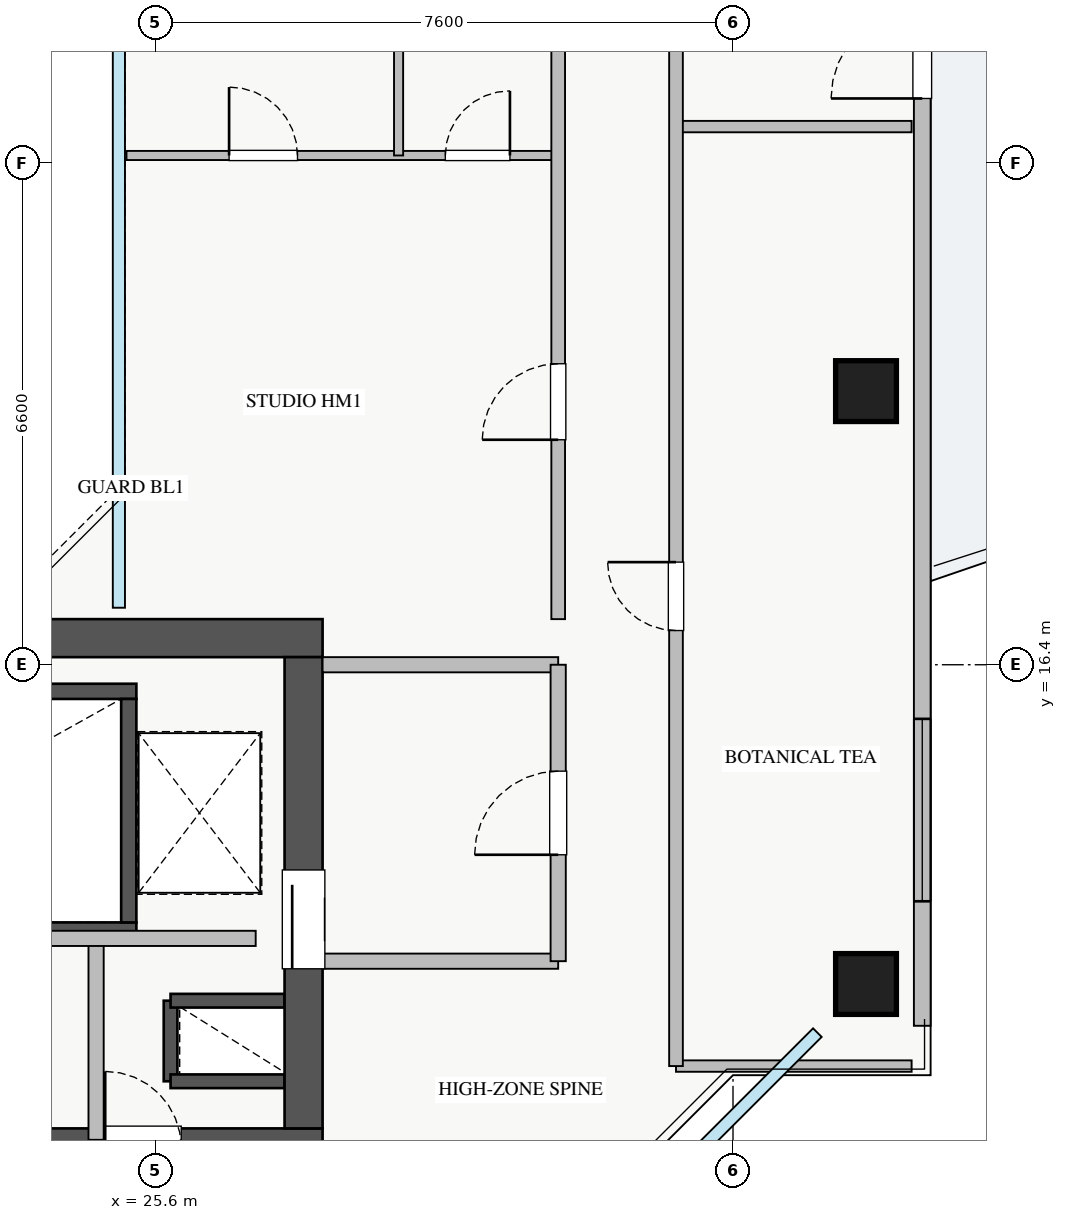
"""IFC4 building model, lengths in metres.
Left out: names, types, materials, properties, quantities, classifications, styles, units other than length and angle.
Written with IfcOpenShell. Run it as: python <this file> out.ifc"""

import sys

from ifc_helpers import new_model, si_unit, direction, frame, frame_2d, origin, origin_2d, place, context, subcontext, project, spatial, rectangle, extrude, source, transform, mapped, element, fill, save


model = new_model("IFC4")
c1 = context("Model", 3, precision=1e-05, world=origin(), true_north=direction((0.0, 1.0)))
c2 = subcontext(c1, "Body", "Model", "MODEL_VIEW")
j1 = project(units=[si_unit("LENGTHUNIT", "METRE"), si_unit("PLANEANGLEUNIT", "RADIAN")], contexts=[c1])
p1 = place(None, origin())
s1 = spatial("IfcSite", under=j1, at=p1, CompositionType="ELEMENT")
p2 = place(p1, origin())
s2 = spatial("IfcBuilding", under=s1, at=p2, CompositionType="ELEMENT")
p3 = place(p2, frame((0.0, 0.0, 197.0)))
s3 = spatial("IfcBuildingStorey", under=s2, at=p3, CompositionType="ELEMENT", Elevation=197.0)
p4 = place(p3, frame((25.8, 10.92, 0.0), z_axis=(0.0, 0.0, 1.0), x_axis=(0.0, 1.0, 0.0)))
e1 = element("IfcWall", 1, at=p4, inside=s3, PredefinedType="SHEAR", context=c2, shape_type="SweptSolid", body=[
    extrude(rectangle(XDim=1.06, YDim=0.18, at=frame_2d((0.53, 0.0))), origin(), (0.0, 0.0, 1.0), 3.07),
])
for number, where, z_axis, x_axis in (
    (2, (25.8, 11.98, 0.0), (0.0, 0.0, 1.0), (1.0, 0.0, 0.0)),
    (3, (25.8, 10.92, 0.0), (0.0, 0.0, 1.0), (1.0, 0.0, 0.0)),
):
    element("IfcWall", number, at=place(p3, frame(where, z_axis=z_axis, x_axis=x_axis)), inside=s3, PredefinedType="SHEAR", context=c2, shape_type="SweptSolid", body=[
        extrude(rectangle(XDim=1.5, YDim=0.18, at=frame_2d((0.75, 0.0))), origin(), (0.0, 0.0, 1.0), 3.07),
    ])
p5 = place(p3, frame((18.2, 12.91, 0.0), z_axis=(0.0, 0.0, 1.0), x_axis=(1.0, 0.0, 0.0)))
e4 = element("IfcWall", 4, at=p5, inside=s3, PredefinedType="SHEAR", context=c2, shape_type="SweptSolid", body=[
    extrude(rectangle(XDim=7.15, YDim=0.2, at=frame_2d((3.575, 0.0))), origin(), (0.0, 0.0, 1.0), 3.25),
])
p6 = place(p5, frame((0.35, 0.0, 0.0)))
e5 = element("IfcOpeningElement", 5, at=p6, cuts=e4, PredefinedType="OPENING", context=c2, shape_type="SweptSolid", body=[
    extrude(rectangle(XDim=1.1, YDim=2.05, at=frame_2d((0.55, 1.025))), frame((0.0, 0.11, 0.0), z_axis=(0.0, -1.0, 0.0), x_axis=(1.0, 0.0, 0.0)), (0.0, 0.0, 1.0), 0.22),
])
p7 = place(p3, frame((18.2, 16.05, 0.0), z_axis=(0.0, 0.0, 1.0), x_axis=(1.0, 0.0, 0.0)))
e6 = element("IfcWall", 6, at=p7, inside=s3, PredefinedType="SHEAR", context=c2, shape_type="SweptSolid", body=[
    extrude(rectangle(XDim=7.15, YDim=0.2, at=frame_2d((3.575, 0.0))), origin(), (0.0, 0.0, 1.0), 3.25),
])
p8 = place(p3, frame((25.25, 13.01, 0.0), z_axis=(0.0, 0.0, 1.0), x_axis=(0.0, 1.0, 0.0)))
e7 = element("IfcWall", 7, at=p8, inside=s3, PredefinedType="SHEAR", context=c2, shape_type="SweptSolid", body=[
    extrude(rectangle(XDim=2.94, YDim=0.2, at=frame_2d((1.47, 0.0))), origin(), (0.0, 0.0, 1.0), 3.25),
])
p9 = place(p3, frame((10.2, 10.05, 0.0), z_axis=(0.0, 0.0, 1.0), x_axis=(1.0, 0.0, 0.0)))
e8 = element("IfcWall", 8, at=p9, inside=s3, PredefinedType="SHEAR", context=c2, shape_type="SweptSolid", body=[
    extrude(rectangle(XDim=17.6, YDim=0.5, at=frame_2d((8.8, 0.0))), origin(), (0.0, 0.0, 1.0), 3.25),
])
p10 = place(p9, frame((1.15, 0.0, 0.0)))
e9 = element("IfcOpeningElement", 9, at=p10, cuts=e8, PredefinedType="OPENING", context=c2, shape_type="SweptSolid", body=[
    extrude(rectangle(XDim=1.1, YDim=2.05, at=frame_2d((0.55, 1.025))), frame((0.0, 0.26, 0.0), z_axis=(0.0, -1.0, 0.0), x_axis=(1.0, 0.0, 0.0)), (0.0, 0.0, 1.0), 0.52),
])
p11 = place(p9, frame((8.3, 0.0, 0.0)))
e10 = element("IfcOpeningElement", 10, at=p11, cuts=e8, PredefinedType="OPENING", context=c2, shape_type="SweptSolid", body=[
    extrude(rectangle(XDim=1.1, YDim=2.05, at=frame_2d((0.55, 1.025))), frame((0.0, 0.26, 0.0), z_axis=(0.0, -1.0, 0.0), x_axis=(1.0, 0.0, 0.0)), (0.0, 0.0, 1.0), 0.52),
])
p12 = place(p9, frame((2.85, 0.0, 0.0)))
e11 = element("IfcOpeningElement", 11, at=p12, cuts=e8, PredefinedType="OPENING", context=c2, shape_type="SweptSolid", body=[
    extrude(rectangle(XDim=1.1, YDim=2.05, at=frame_2d((0.55, 1.025))), frame((0.0, 0.26, 0.0), z_axis=(0.0, -1.0, 0.0), x_axis=(1.0, 0.0, 0.0)), (0.0, 0.0, 1.0), 0.52),
])
p13 = place(p9, frame((5.8, 0.0, 0.0)))
e12 = element("IfcOpeningElement", 12, at=p13, cuts=e8, PredefinedType="OPENING", context=c2, shape_type="SweptSolid", body=[
    extrude(rectangle(XDim=1.0, YDim=2.05, at=frame_2d((0.5, 1.025))), frame((0.0, 0.26, 0.0), z_axis=(0.0, -1.0, 0.0), x_axis=(1.0, 0.0, 0.0)), (0.0, 0.0, 1.0), 0.52),
])
p14 = place(p9, frame((14.74, 0.0, 0.0)))
e13 = element("IfcOpeningElement", 13, at=p14, cuts=e8, PredefinedType="OPENING", context=c2, shape_type="SweptSolid", body=[
    extrude(rectangle(XDim=1.0, YDim=2.05, at=frame_2d((0.5, 1.025))), frame((0.0, 0.26, 0.0), z_axis=(0.0, -1.0, 0.0), x_axis=(1.0, 0.0, 0.0)), (0.0, 0.0, 1.0), 0.52),
])
p15 = place(p9, frame((11.67, 0.0, 0.0)))
e14 = element("IfcOpeningElement", 14, at=p15, cuts=e8, PredefinedType="OPENING", context=c2, shape_type="SweptSolid", body=[
    extrude(rectangle(XDim=1.0, YDim=2.05, at=frame_2d((0.5, 1.025))), frame((0.0, 0.26, 0.0), z_axis=(0.0, -1.0, 0.0), x_axis=(1.0, 0.0, 0.0)), (0.0, 0.0, 1.0), 0.52),
])
p16 = place(p3, frame((10.2, 16.75, 0.0), z_axis=(0.0, 0.0, 1.0), x_axis=(1.0, 0.0, 0.0)))
e15 = element("IfcWall", 15, at=p16, inside=s3, PredefinedType="SHEAR", context=c2, shape_type="SweptSolid", body=[
    extrude(rectangle(XDim=17.6, YDim=0.5, at=frame_2d((8.8, 0.0))), origin(), (0.0, 0.0, 1.0), 3.25),
])
p17 = place(p3, frame((27.55, 10.3, 0.0), z_axis=(0.0, 0.0, 1.0), x_axis=(0.0, 1.0, 0.0)))
e16 = element("IfcWall", 16, at=p17, inside=s3, PredefinedType="SHEAR", context=c2, shape_type="SweptSolid", body=[
    extrude(rectangle(XDim=6.2, YDim=0.5, at=frame_2d((3.1, 0.0))), origin(), (0.0, 0.0, 1.0), 3.25),
])
p18 = place(p17, frame((2.1, 0.0, 0.0)))
e17 = element("IfcOpeningElement", 17, at=p18, cuts=e16, PredefinedType="OPENING", context=c2, shape_type="SweptSolid", body=[
    extrude(rectangle(XDim=1.3, YDim=2.05, at=frame_2d((0.65, 1.025))), frame((0.0, 0.26, 0.0), z_axis=(0.0, -1.0, 0.0), x_axis=(1.0, 0.0, 0.0)), (0.0, 0.0, 1.0), 0.52),
])
m1 = source(origin(), c2, "Body", "SweptSolid", [
    extrude(rectangle(XDim=0.8, YDim=0.8, at=origin_2d()), origin(), (0.0, 0.0, 1.0), 3.25),
])
for number, where, z_axis, x_axis in (
    (18, (34.95, 12.2, 0.0), (0.0, 0.0, 1.0), (1.0, 0.0, 0.0)),
    (19, (34.95, 20.0, 0.0), (0.0, 0.0, 1.0), (1.0, 0.0, 0.0)),
):
    element("IfcColumn", number, at=place(p3, frame(where, z_axis=z_axis, x_axis=x_axis)), inside=s3, PredefinedType="COLUMN", context=c2, shape_type="MappedRepresentation", body=[
        mapped(m1, transform((0.0, 0.0, 0.0), x_axis=(1.0, 0.0, 0.0), y_axis=(0.0, 1.0, 0.0), z_axis=(0.0, 0.0, 1.0), scale=1.0)),
    ])
p19 = place(p3, frame((35.69, 11.65, 0.0), z_axis=(0.0, 0.0, 1.0), x_axis=(0.0, 1.0, 0.0)))
e20 = element("IfcWall", 20, at=p19, inside=s3, PredefinedType="STANDARD", context=c2, shape_type="SweptSolid", body=[
    extrude(rectangle(XDim=22.7, YDim=0.22, at=frame_2d((11.35, 0.0))), origin(), (0.0, 0.0, 1.0), 2.61),
])
p20 = place(p19, frame((12.2, 0.0, 0.0)))
e21 = element("IfcOpeningElement", 21, at=p20, cuts=e20, PredefinedType="OPENING", context=c2, shape_type="SweptSolid", body=[
    extrude(rectangle(XDim=1.2, YDim=2.1, at=frame_2d((0.6, 1.05))), frame((0.0, 0.12, 0.0), z_axis=(0.0, -1.0, 0.0), x_axis=(1.0, 0.0, 0.0)), (0.0, 0.0, 1.0), 0.24),
])
p21 = place(p19, frame((1.638, 0.0, 0.9)))
e22 = element("IfcOpeningElement", 22, at=p21, cuts=e20, PredefinedType="OPENING", context=c2, shape_type="SweptSolid", body=[
    extrude(rectangle(XDim=2.4, YDim=1.48, at=frame_2d((1.2, 0.74))), frame((0.0, 0.12, 0.0), z_axis=(0.0, -1.0, 0.0), x_axis=(1.0, 0.0, 0.0)), (0.0, 0.0, 1.0), 0.24),
])
p22 = place(p19, frame((18.813, 0.0, 0.9)))
e23 = element("IfcOpeningElement", 23, at=p22, cuts=e20, PredefinedType="OPENING", context=c2, shape_type="SweptSolid", body=[
    extrude(rectangle(XDim=2.1, YDim=1.48, at=frame_2d((1.05, 0.74))), frame((0.0, 0.12, 0.0), z_axis=(0.0, -1.0, 0.0), x_axis=(1.0, 0.0, 0.0)), (0.0, 0.0, 1.0), 0.24),
])
p23 = place(p3, frame((27.8, 16.4, 0.0), z_axis=(0.0, 0.0, 1.0), x_axis=(1.0, 0.0, 0.0)))
e24 = element("IfcWall", 24, at=p23, inside=s3, PredefinedType="PARTITIONING", context=c2, shape_type="SweptSolid", body=[
    extrude(rectangle(XDim=3.1, YDim=0.2, at=frame_2d((1.55, 0.0))), origin(), (0.0, 0.0, 1.0), 3.07),
])
p24 = place(p3, frame((27.8, 12.5, 0.0), z_axis=(0.0, 0.0, 1.0), x_axis=(1.0, 0.0, 0.0)))
e25 = element("IfcWall", 25, at=p24, inside=s3, PredefinedType="PARTITIONING", context=c2, shape_type="SweptSolid", body=[
    extrude(rectangle(XDim=3.1, YDim=0.2, at=frame_2d((1.55, 0.0))), origin(), (0.0, 0.0, 1.0), 2.265),
])
p25 = place(p3, frame((30.9, 12.5, 0.0), z_axis=(0.0, 0.0, 1.0), x_axis=(0.0, 1.0, 0.0)))
e26 = element("IfcWall", 26, at=p25, inside=s3, PredefinedType="PARTITIONING", context=c2, shape_type="SweptSolid", body=[
    extrude(rectangle(XDim=3.9, YDim=0.2, at=frame_2d((1.95, 0.0))), origin(), (0.0, 0.0, 1.0), 3.07),
])
p26 = place(p25, frame((1.4, 0.0, 0.0)))
e27 = element("IfcOpeningElement", 27, at=p26, cuts=e26, PredefinedType="OPENING", context=c2, shape_type="SweptSolid", body=[
    extrude(rectangle(XDim=1.1, YDim=2.05, at=frame_2d((0.55, 1.025))), frame((0.0, 0.11, 0.0), z_axis=(0.0, -1.0, 0.0), x_axis=(1.0, 0.0, 0.0)), (0.0, 0.0, 1.0), 0.22),
])
p27 = place(p3, frame((24.82, 10.15, 0.0), z_axis=(0.0, 0.0, 1.0), x_axis=(0.0, 1.0, 0.0)))
e28 = element("IfcWall", 28, at=p27, inside=s3, PredefinedType="PARTITIONING", context=c2, shape_type="SweptSolid", body=[
    extrude(rectangle(XDim=2.65, YDim=0.2, at=frame_2d((1.325, 0.0))), origin(), (0.0, 0.0, 1.0), 3.07),
])
p28 = place(p3, frame((21.75, 12.8, 0.0), z_axis=(0.0, 0.0, 1.0), x_axis=(1.0, 0.0, 0.0)))
e29 = element("IfcWall", 29, at=p28, inside=s3, PredefinedType="PARTITIONING", context=c2, shape_type="SweptSolid", body=[
    extrude(rectangle(XDim=5.17, YDim=0.2, at=frame_2d((2.585, 0.0))), origin(), (0.0, 0.0, 1.0), 3.07),
])
p29 = place(p3, frame((25.22, 23.1, 0.0), z_axis=(0.0, 0.0, 1.0), x_axis=(1.0, 0.0, 0.0)))
e30 = element("IfcWall", 30, at=p29, inside=s3, PredefinedType="PLUMBINGWALL", context=c2, shape_type="SweptSolid", body=[
    extrude(rectangle(XDim=5.68, YDim=0.12, at=frame_2d((2.84, 0.0))), origin(), (0.0, 0.0, 1.0), 3.07),
])
p30 = place(p29, frame((1.35, 0.0, 0.0)))
e31 = element("IfcOpeningElement", 31, at=p30, cuts=e30, PredefinedType="OPENING", context=c2, shape_type="SweptSolid", body=[
    extrude(rectangle(XDim=0.9, YDim=2.05, at=frame_2d((0.45, 1.025))), frame((0.0, 0.07, 0.0), z_axis=(0.0, -1.0, 0.0), x_axis=(1.0, 0.0, 0.0)), (0.0, 0.0, 1.0), 0.14),
])
p31 = place(p29, frame((4.195, 0.0, 0.0)))
e32 = element("IfcOpeningElement", 32, at=p31, cuts=e30, PredefinedType="OPENING", context=c2, shape_type="SweptSolid", body=[
    extrude(rectangle(XDim=0.85, YDim=2.05, at=frame_2d((0.425, 1.025))), frame((0.0, 0.07, 0.0), z_axis=(0.0, -1.0, 0.0), x_axis=(1.0, 0.0, 0.0)), (0.0, 0.0, 1.0), 0.14),
])
p32 = place(p3, frame((28.8, 23.1, 0.0), z_axis=(0.0, 0.0, 1.0), x_axis=(0.0, 1.0, 0.0)))
e33 = element("IfcWall", 33, at=p32, inside=s3, PredefinedType="PLUMBINGWALL", context=c2, shape_type="SweptSolid", body=[
    extrude(rectangle(XDim=5.9, YDim=0.12, at=frame_2d((2.95, 0.0))), origin(), (0.0, 0.0, 1.0), 3.07),
])
p33 = place(p3, frame((30.9, 17.0, 0.0), z_axis=(0.0, 0.0, 1.0), x_axis=(0.0, 1.0, 0.0)))
e34 = element("IfcWall", 34, at=p33, inside=s3, PredefinedType="PARTITIONING", context=c2, shape_type="SweptSolid", body=[
    extrude(rectangle(XDim=12.0, YDim=0.18, at=frame_2d((6.0, 0.0))), origin(), (0.0, 0.0, 1.0), 3.07),
])
p34 = place(p33, frame((2.36, 0.0, 0.0)))
e35 = element("IfcOpeningElement", 35, at=p34, cuts=e34, PredefinedType="OPENING", context=c2, shape_type="SweptSolid", body=[
    extrude(rectangle(XDim=1.0, YDim=2.05, at=frame_2d((0.5, 1.025))), frame((0.0, 0.1, 0.0), z_axis=(0.0, -1.0, 0.0), x_axis=(1.0, 0.0, 0.0)), (0.0, 0.0, 1.0), 0.2),
])
for number, where, z_axis, x_axis in (
    (36, (32.45, 11.12, 0.0), (0.0, 0.0, 1.0), (1.0, 0.0, 0.0)),
    (37, (32.45, 23.48, 0.0), (0.0, 0.0, 1.0), (1.0, 0.0, 0.0)),
):
    element("IfcWall", number, at=place(p3, frame(where, z_axis=z_axis, x_axis=x_axis)), inside=s3, PredefinedType="PARTITIONING", context=c2, shape_type="SweptSolid", body=[
        extrude(rectangle(XDim=3.1, YDim=0.15, at=frame_2d((1.55, 0.0))), origin(), (0.0, 0.0, 1.0), 3.07),
    ])
p35 = place(p3, frame((32.45, 11.12, 0.0), z_axis=(0.0, 0.0, 1.0), x_axis=(0.0, 1.0, 0.0)))
e38 = element("IfcWall", 38, at=p35, inside=s3, PredefinedType="PARTITIONING", context=c2, shape_type="SweptSolid", body=[
    extrude(rectangle(XDim=23.76, YDim=0.18, at=frame_2d((11.88, 0.0))), origin(), (0.0, 0.0, 1.0), 3.07),
])
p36 = place(p35, frame((5.73, 0.0, 0.0)))
e39 = element("IfcOpeningElement", 39, at=p36, cuts=e38, PredefinedType="OPENING", context=c2, shape_type="SweptSolid", body=[
    extrude(rectangle(XDim=0.9, YDim=2.05, at=frame_2d((0.45, 1.025))), frame((0.0, 0.1, 0.0), z_axis=(0.0, -1.0, 0.0), x_axis=(1.0, 0.0, 0.0)), (0.0, 0.0, 1.0), 0.2),
])
p37 = place(p35, frame((17.61, 0.0, 0.0)))
e40 = element("IfcOpeningElement", 40, at=p37, cuts=e38, PredefinedType="OPENING", context=c2, shape_type="SweptSolid", body=[
    extrude(rectangle(XDim=0.9, YDim=2.05, at=frame_2d((0.45, 1.025))), frame((0.0, 0.1, 0.0), z_axis=(0.0, -1.0, 0.0), x_axis=(1.0, 0.0, 0.0)), (0.0, 0.0, 1.0), 0.2),
])
m2 = source(origin(), c2, "Body", "SweptSolid", [
    extrude(rectangle(XDim=1.2, YDim=2.1, at=frame_2d((0.6, 1.05))), frame((0.0, 0.025, 0.0), z_axis=(0.0, -1.0, 0.0), x_axis=(1.0, 0.0, 0.0)), (0.0, 0.0, 1.0), 0.05),
])
p38 = place(p20, origin())
e41 = element("IfcDoor", 41, at=p38, inside=s3, OperationType="SINGLE_SWING_LEFT", PredefinedType="DOOR", context=c2, shape_type="MappedRepresentation", body=[
    mapped(m2, transform((0.0, 0.0, 0.0), x_axis=(1.0, 0.0, 0.0), y_axis=(0.0, 1.0, 0.0), z_axis=(0.0, 0.0, 1.0), scale=1.0)),
])
fill(e21, e41)
m3 = source(origin(), c2, "Body", "SweptSolid", [
    extrude(rectangle(XDim=2.4, YDim=1.48, at=frame_2d((1.2, 0.74))), frame((0.0, 0.03, 0.0), z_axis=(0.0, -1.0, 0.0), x_axis=(1.0, 0.0, 0.0)), (0.0, 0.0, 1.0), 0.06),
])
p39 = place(p21, origin())
e42 = element("IfcWindow", 42, at=p39, inside=s3, PartitioningType="TRIPLE_PANEL_VERTICAL", PredefinedType="WINDOW", context=c2, shape_type="MappedRepresentation", body=[
    mapped(m3, transform((0.0, 0.0, 0.0), x_axis=(1.0, 0.0, 0.0), y_axis=(0.0, 1.0, 0.0), z_axis=(0.0, 0.0, 1.0), scale=1.0)),
])
fill(e22, e42)
m4 = source(origin(), c2, "Body", "SweptSolid", [
    extrude(rectangle(XDim=1.3, YDim=2.05, at=frame_2d((0.65, 1.025))), frame((0.0, 0.025, 0.0), z_axis=(0.0, -1.0, 0.0), x_axis=(1.0, 0.0, 0.0)), (0.0, 0.0, 1.0), 0.05),
])
p40 = place(p18, origin())
e43 = element("IfcDoor", 43, at=p40, inside=s3, OperationType="SLIDING_TO_RIGHT", PredefinedType="DOOR", context=c2, shape_type="MappedRepresentation", body=[
    mapped(m4, transform((0.0, 0.0, 0.0), x_axis=(1.0, 0.0, 0.0), y_axis=(0.0, 1.0, 0.0), z_axis=(0.0, 0.0, 1.0), scale=1.0)),
])
fill(e17, e43)
m5 = source(origin(), c2, "Body", "SweptSolid", [
    extrude(rectangle(XDim=1.1, YDim=2.05, at=frame_2d((0.55, 1.025))), frame((0.0, 0.025, 0.0), z_axis=(0.0, -1.0, 0.0), x_axis=(1.0, 0.0, 0.0)), (0.0, 0.0, 1.0), 0.05),
])
p41 = place(p26, origin())
e44 = element("IfcDoor", 44, at=p41, inside=s3, OperationType="SINGLE_SWING_LEFT", PredefinedType="DOOR", context=c2, shape_type="MappedRepresentation", body=[
    mapped(m5, transform((0.0, 0.0, 0.0), x_axis=(1.0, 0.0, 0.0), y_axis=(0.0, 1.0, 0.0), z_axis=(0.0, 0.0, 1.0), scale=1.0)),
])
fill(e27, e44)
m6 = source(origin(), c2, "Body", "SweptSolid", [
    extrude(rectangle(XDim=0.9, YDim=2.05, at=frame_2d((0.45, 1.025))), frame((0.0, 0.025, 0.0), z_axis=(0.0, -1.0, 0.0), x_axis=(1.0, 0.0, 0.0)), (0.0, 0.0, 1.0), 0.05),
])
p42 = place(p30, origin())
e45 = element("IfcDoor", 45, at=p42, inside=s3, OperationType="SINGLE_SWING_LEFT", PredefinedType="DOOR", context=c2, shape_type="MappedRepresentation", body=[
    mapped(m6, transform((0.0, 0.0, 0.0), x_axis=(1.0, 0.0, 0.0), y_axis=(0.0, 1.0, 0.0), z_axis=(0.0, 0.0, 1.0), scale=1.0)),
])
fill(e31, e45)
m7 = source(origin(), c2, "Body", "SweptSolid", [
    extrude(rectangle(XDim=0.85, YDim=2.05, at=frame_2d((0.425, 1.025))), frame((0.0, 0.025, 0.0), z_axis=(0.0, -1.0, 0.0), x_axis=(1.0, 0.0, 0.0)), (0.0, 0.0, 1.0), 0.05),
])
p43 = place(p31, origin())
e46 = element("IfcDoor", 46, at=p43, inside=s3, OperationType="SINGLE_SWING_RIGHT", PredefinedType="DOOR", context=c2, shape_type="MappedRepresentation", body=[
    mapped(m7, transform((0.0, 0.0, 0.0), x_axis=(1.0, 0.0, 0.0), y_axis=(0.0, 1.0, 0.0), z_axis=(0.0, 0.0, 1.0), scale=1.0)),
])
fill(e32, e46)
m8 = source(origin(), c2, "Body", "SweptSolid", [
    extrude(rectangle(XDim=1.0, YDim=2.05, at=frame_2d((0.5, 1.025))), frame((0.0, 0.025, 0.0), z_axis=(0.0, -1.0, 0.0), x_axis=(1.0, 0.0, 0.0)), (0.0, 0.0, 1.0), 0.05),
])
p44 = place(p34, origin())
e47 = element("IfcDoor", 47, at=p44, inside=s3, OperationType="SINGLE_SWING_LEFT", PredefinedType="DOOR", context=c2, shape_type="MappedRepresentation", body=[
    mapped(m8, transform((0.0, 0.0, 0.0), x_axis=(1.0, 0.0, 0.0), y_axis=(0.0, 1.0, 0.0), z_axis=(0.0, 0.0, 1.0), scale=1.0)),
])
fill(e35, e47)
p45 = place(p36, origin())
e48 = element("IfcDoor", 48, at=p45, inside=s3, OperationType="SINGLE_SWING_RIGHT", PredefinedType="DOOR", context=c2, shape_type="MappedRepresentation", body=[
    mapped(m6, transform((0.0, 0.0, 0.0), x_axis=(1.0, 0.0, 0.0), y_axis=(0.0, 1.0, 0.0), z_axis=(0.0, 0.0, 1.0), scale=1.0)),
])
fill(e39, e48)
save(model, sys.argv[1])
